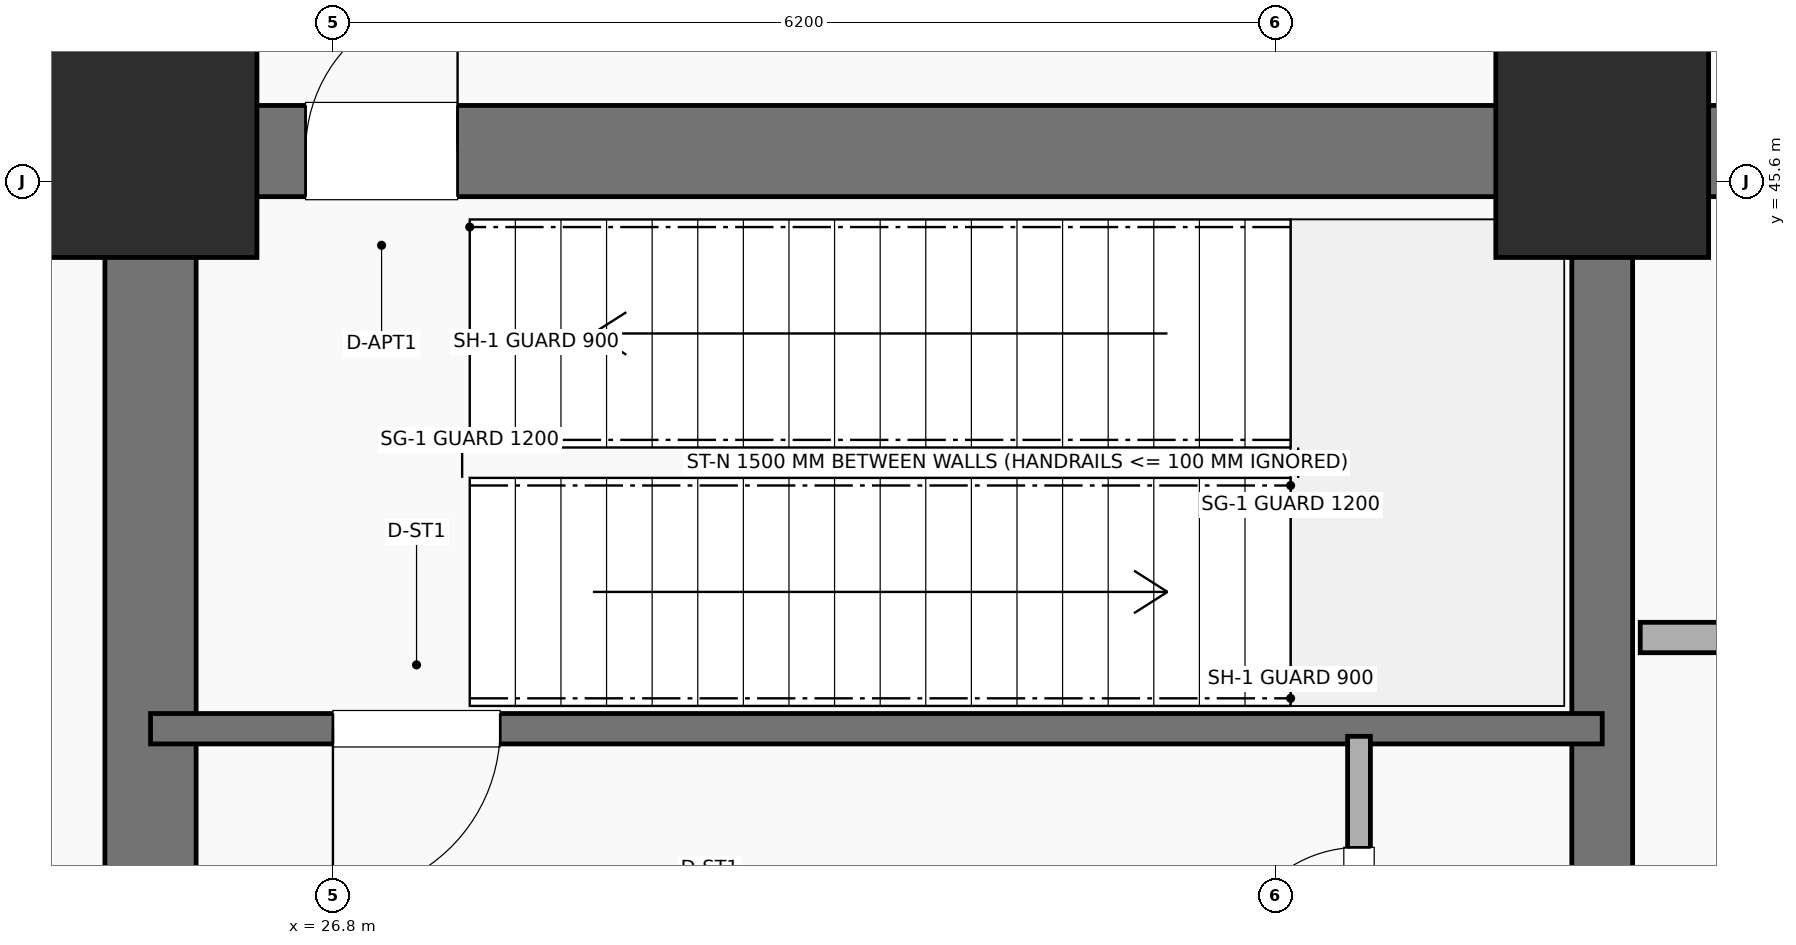
"""IFC4 building model, lengths in metres.
Left out: names, types, materials, properties, quantities, classifications, styles, units other than length and angle.
Written with IfcOpenShell. Run it as: python <this file> out.ifc"""

import sys

from ifc_helpers import new_model, si_unit, direction, frame, frame_2d, origin, origin_2d, place, context, subcontext, project, spatial, rectangle, extrude, element, fill, save


model = new_model("IFC4")
c1 = context("Model", 3, precision=1e-05, world=origin(), true_north=direction((0.0, 1.0)))
c2 = subcontext(c1, "Body", "Model", "MODEL_VIEW")
j1 = project(units=[si_unit("LENGTHUNIT", "METRE"), si_unit("PLANEANGLEUNIT", "RADIAN")], contexts=[c1])
p1 = place(None, origin())
s1 = spatial("IfcSite", under=j1, at=p1, CompositionType="ELEMENT")
p2 = place(p1, origin())
s2 = spatial("IfcBuilding", under=s1, at=p2, CompositionType="ELEMENT")
p3 = place(p2, origin())
s3 = spatial("IfcBuildingStorey", under=s2, at=p3, CompositionType="ELEMENT", Elevation=0.0)
p4 = place(p3, frame((25.6, 45.8, 0.0), z_axis=(0.0, 0.0, 1.0), x_axis=(1.0, 0.0, 0.0)))
e1 = element("IfcWall", 1, at=p4, inside=s3, PredefinedType="SHEAR", context=c2, shape_type="SweptSolid", body=[
    extrude(rectangle(XDim=27.2, YDim=0.6, at=frame_2d((13.6, 0.0))), origin(), (0.0, 0.0, 1.0), 6.6),
])
p5 = place(p4, frame((1.02, 0.0, 0.0)))
e2 = element("IfcOpeningElement", 2, at=p5, cuts=e1, PredefinedType="OPENING", context=c2, shape_type="SweptSolid", body=[
    extrude(rectangle(XDim=1.0, YDim=2.15, at=frame_2d((0.5, 1.075))), frame((0.0, 0.31, 0.0), z_axis=(0.0, -1.0, 0.0), x_axis=(1.0, 0.0, 0.0)), (0.0, 0.0, 1.0), 0.62),
])
p6 = place(p3, frame((25.6, 39.9, 0.0), z_axis=(0.0, 0.0, 1.0), x_axis=(0.0, 1.0, 0.0)))
e3 = element("IfcWall", 3, at=p6, inside=s3, PredefinedType="SHEAR", context=c2, shape_type="SweptSolid", body=[
    extrude(rectangle(XDim=5.6, YDim=0.6, at=frame_2d((2.8, 0.0))), origin(), (0.0, 0.0, 1.0), 6.6),
])
p7 = place(p3, frame((35.15, 39.9, 0.0), z_axis=(0.0, 0.0, 1.0), x_axis=(0.0, 1.0, 0.0)))
e4 = element("IfcWall", 4, at=p7, inside=s3, PredefinedType="SHEAR", context=c2, shape_type="SweptSolid", body=[
    extrude(rectangle(XDim=5.6, YDim=0.4, at=frame_2d((2.8, 0.0))), origin(), (0.0, 0.0, 1.0), 6.6),
])
for number, where, z_axis, x_axis in (
    (5, (25.6, 45.8, 0.0), (0.0, 0.0, 1.0), (1.0, 0.0, 0.0)),
    (6, (35.15, 45.8, 0.0), (0.0, 0.0, 1.0), (1.0, 0.0, 0.0)),
):
    element("IfcColumn", number, at=place(p3, frame(where, z_axis=z_axis, x_axis=x_axis)), inside=s3, PredefinedType="COLUMN", context=c2, shape_type="SweptSolid", body=[
        extrude(rectangle(XDim=1.4, YDim=1.4, at=origin_2d()), origin(), (0.0, 0.0, 1.0), 6.6),
    ])
p8 = place(p3, frame((35.15, 42.0, 0.0), z_axis=(0.0, 0.0, 1.0), x_axis=(-1.0, 0.0, 0.0)))
e7 = element("IfcWall", 7, at=p8, inside=s3, PredefinedType="SHEAR", context=c2, shape_type="SweptSolid", body=[
    extrude(rectangle(XDim=9.55, YDim=0.2, at=frame_2d((4.775, 0.0))), origin(), (0.0, 0.0, 1.0), 6.6),
])
p9 = place(p8, frame((7.25, 0.0, 0.0)))
e8 = element("IfcOpeningElement", 8, at=p9, cuts=e7, PredefinedType="OPENING", context=c2, shape_type="SweptSolid", body=[
    extrude(rectangle(XDim=1.1, YDim=2.15, at=frame_2d((0.55, 1.075))), frame((0.0, 0.11, 0.0), z_axis=(0.0, -1.0, 0.0), x_axis=(1.0, 0.0, 0.0)), (0.0, 0.0, 1.0), 0.22),
])
p10 = place(p3, frame((33.55, 39.82, 0.0), z_axis=(0.0, 0.0, 1.0), x_axis=(0.0, 1.0, 0.0)))
e9 = element("IfcWall", 9, at=p10, inside=s3, PredefinedType="PARTITIONING", context=c2, shape_type="SweptSolid", body=[
    extrude(rectangle(XDim=2.13, YDim=0.15, at=frame_2d((1.065, 0.0))), origin(), (0.0, 0.0, 1.0), 5.52),
])
p11 = place(p10, frame((0.55, 0.0, 0.0)))
e10 = element("IfcOpeningElement", 10, at=p11, cuts=e9, PredefinedType="OPENING", context=c2, shape_type="SweptSolid", body=[
    extrude(rectangle(XDim=0.85, YDim=2.05, at=frame_2d((0.425, 1.025))), frame((0.0, 0.085, 0.0), z_axis=(0.0, -1.0, 0.0), x_axis=(1.0, 0.0, 0.0)), (0.0, 0.0, 1.0), 0.17),
])
p12 = place(p3, frame((37.95, 42.6, 0.0), z_axis=(0.0, 0.0, 1.0), x_axis=(-1.0, 0.0, 0.0)))
e11 = element("IfcWall", 11, at=p12, inside=s3, PredefinedType="PARTITIONING", context=c2, shape_type="SweptSolid", body=[
    extrude(rectangle(XDim=2.55, YDim=0.2, at=frame_2d((1.275, 0.0))), origin(), (0.0, 0.0, 1.0), 5.18),
])
p13 = place(p12, frame((0.75, 0.0, 0.0)))
e12 = element("IfcOpeningElement", 12, at=p13, cuts=e11, PredefinedType="OPENING", context=c2, shape_type="SweptSolid", body=[
    extrude(rectangle(XDim=1.1, YDim=2.15, at=frame_2d((0.55, 1.075))), frame((0.0, 0.11, 0.0), z_axis=(0.0, -1.0, 0.0), x_axis=(1.0, 0.0, 0.0)), (0.0, 0.0, 1.0), 0.22),
])
p14 = place(p9, origin())
e13 = element("IfcDoor", 13, at=p14, inside=s3, OperationType="SINGLE_SWING_RIGHT", PredefinedType="DOOR", context=c2, shape_type="SweptSolid", body=[
    extrude(rectangle(XDim=1.1, YDim=2.15, at=frame_2d((0.55, 1.075))), frame((0.0, 0.025, 0.0), z_axis=(0.0, -1.0, 0.0), x_axis=(1.0, 0.0, 0.0)), (0.0, 0.0, 1.0), 0.05),
])
fill(e8, e13)
p15 = place(p11, origin())
e14 = element("IfcDoor", 14, at=p15, inside=s3, OperationType="SINGLE_SWING_LEFT", PredefinedType="TRAPDOOR", context=c2, shape_type="SweptSolid", body=[
    extrude(rectangle(XDim=0.85, YDim=2.05, at=frame_2d((0.425, 1.025))), frame((0.0, 0.025, 0.0), z_axis=(0.0, -1.0, 0.0), x_axis=(1.0, 0.0, 0.0)), (0.0, 0.0, 1.0), 0.05),
])
fill(e10, e14)
p16 = place(p5, origin())
e15 = element("IfcDoor", 15, at=p16, inside=s3, OperationType="SINGLE_SWING_RIGHT", PredefinedType="DOOR", context=c2, shape_type="SweptSolid", body=[
    extrude(rectangle(XDim=1.0, YDim=2.15, at=frame_2d((0.5, 1.075))), frame((0.0, 0.025, 0.0), z_axis=(0.0, -1.0, 0.0), x_axis=(1.0, 0.0, 0.0)), (0.0, 0.0, 1.0), 0.05),
])
fill(e2, e15)
save(model, sys.argv[1])
